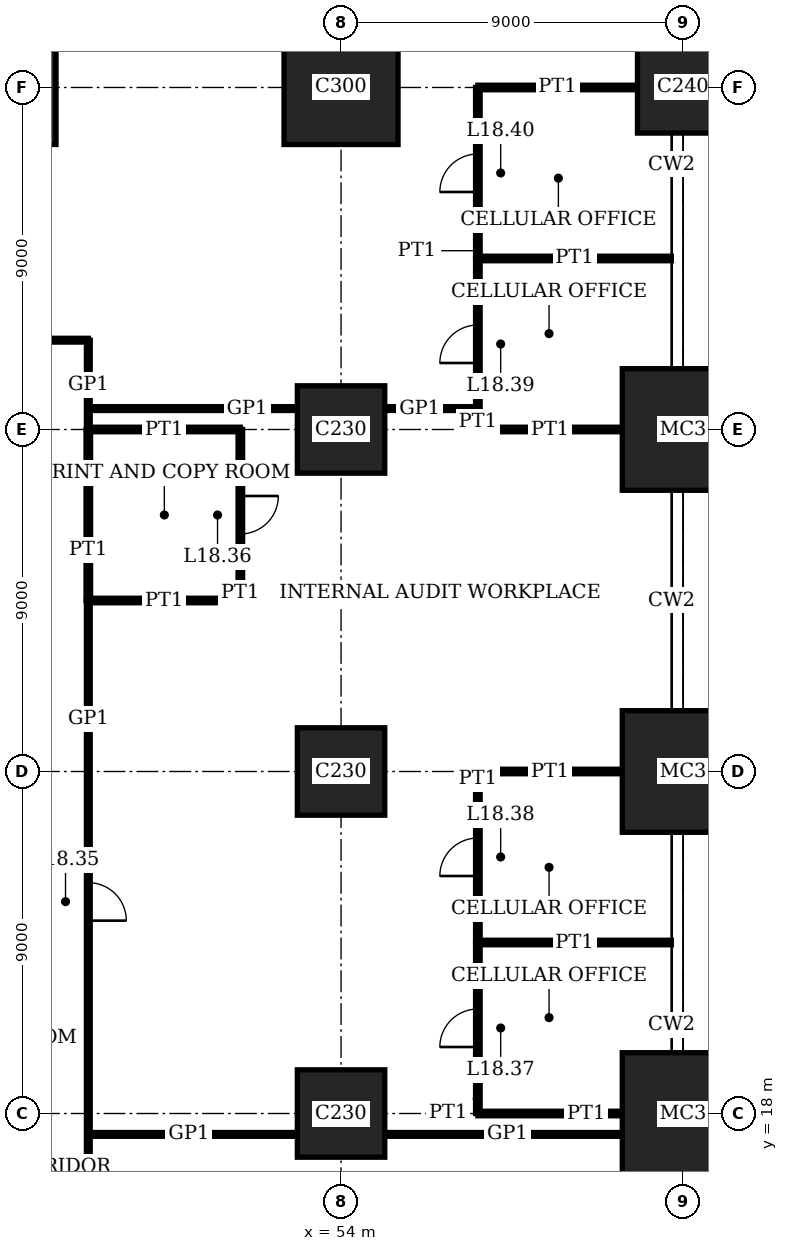
"""IFC4 building model, lengths in metres.
Left out: names, types, materials, properties, quantities, classifications, styles, units other than length and angle.
Written with IfcOpenShell. Run it as: python <this file> out.ifc"""

import sys

from ifc_helpers import new_model, si_unit, direction, frame, frame_2d, origin, origin_2d, place, context, subcontext, project, spatial, rectangle, extrude, element, fill, save


model = new_model("IFC4")
c1 = context("Model", 3, precision=1e-05, world=origin(), true_north=direction((0.0, 1.0)))
c2 = subcontext(c1, "Body", "Model", "MODEL_VIEW")
j1 = project(units=[si_unit("LENGTHUNIT", "METRE"), si_unit("PLANEANGLEUNIT", "RADIAN")], contexts=[c1])
p1 = place(None, origin())
s1 = spatial("IfcSite", under=j1, at=p1, CompositionType="ELEMENT")
p2 = place(p1, origin())
s2 = spatial("IfcBuilding", under=s1, at=p2, CompositionType="ELEMENT")
p3 = place(p2, frame((0.0, 0.0, 75.8)))
s3 = spatial("IfcBuildingStorey", under=s2, at=p3, CompositionType="ELEMENT", Elevation=75.8)
p4 = place(p3, frame((45.0, 45.0, 0.0), z_axis=(0.0, 0.0, 1.0), x_axis=(1.0, 0.0, 0.0)))
e1 = element("IfcColumn", 1, at=p4, inside=s3, PredefinedType="COLUMN", context=c2, shape_type="SweptSolid", body=[
    extrude(rectangle(XDim=3.0, YDim=3.0, at=origin_2d()), origin(), (0.0, 0.0, 1.0), 4.2),
])
for number, where, z_axis, x_axis in (
    (2, (54.0, 18.0, 0.0), (0.0, 0.0, 1.0), (1.0, 0.0, 0.0)),
    (3, (54.0, 27.0, 0.0), (0.0, 0.0, 1.0), (1.0, 0.0, 0.0)),
    (4, (54.0, 36.0, 0.0), (0.0, 0.0, 1.0), (1.0, 0.0, 0.0)),
):
    element("IfcColumn", number, at=place(p3, frame(where, z_axis=z_axis, x_axis=x_axis)), inside=s3, PredefinedType="COLUMN", context=c2, shape_type="SweptSolid", body=[
        extrude(rectangle(XDim=2.3, YDim=2.3, at=origin_2d()), origin(), (0.0, 0.0, 1.0), 4.2),
    ])
p5 = place(p3, frame((54.0, 45.0, 0.0), z_axis=(0.0, 0.0, 1.0), x_axis=(1.0, 0.0, 0.0)))
e5 = element("IfcColumn", 5, at=p5, inside=s3, PredefinedType="COLUMN", context=c2, shape_type="SweptSolid", body=[
    extrude(rectangle(XDim=3.0, YDim=3.0, at=origin_2d()), origin(), (0.0, 0.0, 1.0), 4.2),
])
for number, where, z_axis, x_axis in (
    (6, (63.0, 18.0, 0.0), (0.0, 0.0, 1.0), (1.0, 0.0, 0.0)),
    (7, (63.0, 27.0, 0.0), (0.0, 0.0, 1.0), (1.0, 0.0, 0.0)),
    (8, (63.0, 36.0, 0.0), (0.0, 0.0, 1.0), (1.0, 0.0, 0.0)),
):
    element("IfcColumn", number, at=place(p3, frame(where, z_axis=z_axis, x_axis=x_axis)), inside=s3, PredefinedType="COLUMN", context=c2, shape_type="SweptSolid", body=[
        extrude(rectangle(XDim=3.2, YDim=3.2, at=origin_2d()), origin(), (0.0, 0.0, 1.0), 4.2),
    ])
p6 = place(p3, frame((63.0, 45.0, 0.0), z_axis=(0.0, 0.0, 1.0), x_axis=(1.0, 0.0, 0.0)))
e9 = element("IfcColumn", 9, at=p6, inside=s3, PredefinedType="COLUMN", context=c2, shape_type="SweptSolid", body=[
    extrude(rectangle(XDim=2.4, YDim=2.4, at=origin_2d()), origin(), (0.0, 0.0, 1.0), 4.2),
])
p7 = place(p3, frame((47.35, 17.45, 0.0), z_axis=(0.0, 0.0, 1.0), x_axis=(1.0, 0.0, 0.0)))
e10 = element("IfcWall", 10, at=p7, inside=s3, PredefinedType="PARTITIONING", context=c2, shape_type="SweptSolid", body=[
    extrude(rectangle(XDim=5.5, YDim=0.1, at=frame_2d((2.75, 0.0))), origin(), (0.0, 0.0, 1.0), 3.85),
])
p8 = place(p3, frame((55.15, 17.45, 0.0), z_axis=(0.0, 0.0, 1.0), x_axis=(1.0, 0.0, 0.0)))
e11 = element("IfcWall", 11, at=p8, inside=s3, PredefinedType="PARTITIONING", context=c2, shape_type="SweptSolid", body=[
    extrude(rectangle(XDim=6.25, YDim=0.1, at=frame_2d((3.125, 0.0))), origin(), (0.0, 0.0, 1.0), 3.85),
])
p9 = place(p3, frame((57.6, 18.0, 0.0), z_axis=(0.0, 0.0, 1.0), x_axis=(1.0, 0.0, 0.0)))
e12 = element("IfcWall", 12, at=p9, inside=s3, PredefinedType="PARTITIONING", context=c2, shape_type="SweptSolid", body=[
    extrude(rectangle(XDim=3.8, YDim=0.12, at=frame_2d((1.9, 0.0))), origin(), (0.0, 0.0, 1.0), 3.25),
])
p10 = place(p3, frame((57.6, 22.5, 0.0), z_axis=(0.0, 0.0, 1.0), x_axis=(1.0, 0.0, 0.0)))
e13 = element("IfcWall", 13, at=p10, inside=s3, PredefinedType="PARTITIONING", context=c2, shape_type="SweptSolid", body=[
    extrude(rectangle(XDim=5.09, YDim=0.12, at=frame_2d((2.545, 0.0))), origin(), (0.0, 0.0, 1.0), 3.15),
])
p11 = place(p3, frame((57.6, 27.0, 0.0), z_axis=(0.0, 0.0, 1.0), x_axis=(1.0, 0.0, 0.0)))
e14 = element("IfcWall", 14, at=p11, inside=s3, PredefinedType="PARTITIONING", context=c2, shape_type="SweptSolid", body=[
    extrude(rectangle(XDim=3.8, YDim=0.12, at=frame_2d((1.9, 0.0))), origin(), (0.0, 0.0, 1.0), 3.25),
])
p12 = place(p3, frame((47.35, 31.5, 0.0), z_axis=(0.0, 0.0, 1.0), x_axis=(1.0, 0.0, 0.0)))
e15 = element("IfcWall", 15, at=p12, inside=s3, PredefinedType="PARTITIONING", context=c2, shape_type="SweptSolid", body=[
    extrude(rectangle(XDim=4.0, YDim=0.12, at=frame_2d((2.0, 0.0))), origin(), (0.0, 0.0, 1.0), 3.15),
])
p13 = place(p3, frame((47.35, 36.0, 0.0), z_axis=(0.0, 0.0, 1.0), x_axis=(1.0, 0.0, 0.0)))
e16 = element("IfcWall", 16, at=p13, inside=s3, PredefinedType="PARTITIONING", context=c2, shape_type="SweptSolid", body=[
    extrude(rectangle(XDim=4.0, YDim=0.12, at=frame_2d((2.0, 0.0))), origin(), (0.0, 0.0, 1.0), 3.25),
])
p14 = place(p3, frame((57.6, 36.0, 0.0), z_axis=(0.0, 0.0, 1.0), x_axis=(1.0, 0.0, 0.0)))
e17 = element("IfcWall", 17, at=p14, inside=s3, PredefinedType="PARTITIONING", context=c2, shape_type="SweptSolid", body=[
    extrude(rectangle(XDim=3.8, YDim=0.12, at=frame_2d((1.9, 0.0))), origin(), (0.0, 0.0, 1.0), 3.25),
])
p15 = place(p3, frame((47.35, 36.55, 0.0), z_axis=(0.0, 0.0, 1.0), x_axis=(1.0, 0.0, 0.0)))
e18 = element("IfcWall", 18, at=p15, inside=s3, PredefinedType="PARTITIONING", context=c2, shape_type="SweptSolid", body=[
    extrude(rectangle(XDim=5.5, YDim=0.1, at=frame_2d((2.75, 0.0))), origin(), (0.0, 0.0, 1.0), 3.85),
])
p16 = place(p3, frame((55.15, 36.55, 0.0), z_axis=(0.0, 0.0, 1.0), x_axis=(1.0, 0.0, 0.0)))
e19 = element("IfcWall", 19, at=p16, inside=s3, PredefinedType="PARTITIONING", context=c2, shape_type="SweptSolid", body=[
    extrude(rectangle(XDim=2.46, YDim=0.1, at=frame_2d((1.23, 0.0))), origin(), (0.0, 0.0, 1.0), 3.85),
])
p17 = place(p3, frame((15.65, 38.35, 0.0), z_axis=(0.0, 0.0, 1.0), x_axis=(1.0, 0.0, 0.0)))
e20 = element("IfcWall", 20, at=p17, inside=s3, PredefinedType="PARTITIONING", context=c2, shape_type="SweptSolid", body=[
    extrude(rectangle(XDim=31.7, YDim=0.1, at=frame_2d((15.85, 0.0))), origin(), (0.0, 0.0, 1.0), 3.85),
])
p18 = place(p17, frame((15.35, 0.0, 0.0)))
e21 = element("IfcOpeningElement", 21, at=p18, cuts=e20, PredefinedType="OPENING", context=c2, shape_type="SweptSolid", body=[
    extrude(rectangle(XDim=1.0, YDim=2.4, at=frame_2d((0.5, 1.2))), frame((0.0, 0.06, 0.0), z_axis=(0.0, -1.0, 0.0), x_axis=(1.0, 0.0, 0.0)), (0.0, 0.0, 1.0), 0.12),
])
p19 = place(p3, frame((57.6, 40.5, 0.0), z_axis=(0.0, 0.0, 1.0), x_axis=(1.0, 0.0, 0.0)))
e22 = element("IfcWall", 22, at=p19, inside=s3, PredefinedType="PARTITIONING", context=c2, shape_type="SweptSolid", body=[
    extrude(rectangle(XDim=5.09, YDim=0.12, at=frame_2d((2.545, 0.0))), origin(), (0.0, 0.0, 1.0), 3.15),
])
p20 = place(p3, frame((57.6, 45.0, 0.0), z_axis=(0.0, 0.0, 1.0), x_axis=(1.0, 0.0, 0.0)))
e23 = element("IfcWall", 23, at=p20, inside=s3, PredefinedType="PARTITIONING", context=c2, shape_type="SweptSolid", body=[
    extrude(rectangle(XDim=4.2, YDim=0.12, at=frame_2d((2.1, 0.0))), origin(), (0.0, 0.0, 1.0), 3.05),
])
p21 = place(p3, frame((47.35, 31.5, 0.0), z_axis=(0.0, 0.0, 1.0), x_axis=(0.0, 1.0, 0.0)))
e24 = element("IfcWall", 24, at=p21, inside=s3, PredefinedType="PARTITIONING", context=c2, shape_type="SweptSolid", body=[
    extrude(rectangle(XDim=4.5, YDim=0.12, at=frame_2d((2.25, 0.0))), origin(), (0.0, 0.0, 1.0), 3.85),
])
p22 = place(p3, frame((47.35, 15.65, 0.0), z_axis=(0.0, 0.0, 1.0), x_axis=(0.0, 1.0, 0.0)))
e25 = element("IfcWall", 25, at=p22, inside=s3, PredefinedType="PARTITIONING", context=c2, shape_type="SweptSolid", body=[
    extrude(rectangle(XDim=15.85, YDim=0.1, at=frame_2d((7.925, 0.0))), origin(), (0.0, 0.0, 1.0), 3.85),
])
p23 = place(p22, frame((7.425, 0.0, 0.0)))
e26 = element("IfcOpeningElement", 26, at=p23, cuts=e25, PredefinedType="OPENING", context=c2, shape_type="SweptSolid", body=[
    extrude(rectangle(XDim=1.0, YDim=2.4, at=frame_2d((0.5, 1.2))), frame((0.0, 0.06, 0.0), z_axis=(0.0, -1.0, 0.0), x_axis=(1.0, 0.0, 0.0)), (0.0, 0.0, 1.0), 0.12),
])
p24 = place(p3, frame((47.35, 36.0, 0.0), z_axis=(0.0, 0.0, 1.0), x_axis=(0.0, 1.0, 0.0)))
e27 = element("IfcWall", 27, at=p24, inside=s3, PredefinedType="PARTITIONING", context=c2, shape_type="SweptSolid", body=[
    extrude(rectangle(XDim=2.35, YDim=0.1, at=frame_2d((1.175, 0.0))), origin(), (0.0, 0.0, 1.0), 3.85),
])
p25 = place(p3, frame((51.35, 31.5, 0.0), z_axis=(0.0, 0.0, 1.0), x_axis=(0.0, 1.0, 0.0)))
e28 = element("IfcWall", 28, at=p25, inside=s3, PredefinedType="PARTITIONING", context=c2, shape_type="SweptSolid", body=[
    extrude(rectangle(XDim=4.5, YDim=0.12, at=frame_2d((2.25, 0.0))), origin(), (0.0, 0.0, 1.0), 3.85),
])
p26 = place(p25, frame((1.75, 0.0, 0.0)))
e29 = element("IfcOpeningElement", 29, at=p26, cuts=e28, PredefinedType="OPENING", context=c2, shape_type="SweptSolid", body=[
    extrude(rectangle(XDim=1.0, YDim=2.4, at=frame_2d((0.5, 1.2))), frame((0.0, 0.07, 0.0), z_axis=(0.0, -1.0, 0.0), x_axis=(1.0, 0.0, 0.0)), (0.0, 0.0, 1.0), 0.14),
])
p27 = place(p3, frame((57.6, 18.0, 0.0), z_axis=(0.0, 0.0, 1.0), x_axis=(0.0, 1.0, 0.0)))
e30 = element("IfcWall", 30, at=p27, inside=s3, PredefinedType="PARTITIONING", context=c2, shape_type="SweptSolid", body=[
    extrude(rectangle(XDim=4.5, YDim=0.12, at=frame_2d((2.25, 0.0))), origin(), (0.0, 0.0, 1.0), 3.85),
])
p28 = place(p27, frame((1.75, 0.0, 0.0)))
e31 = element("IfcOpeningElement", 31, at=p28, cuts=e30, PredefinedType="OPENING", context=c2, shape_type="SweptSolid", body=[
    extrude(rectangle(XDim=1.0, YDim=2.4, at=frame_2d((0.5, 1.2))), frame((0.0, 0.07, 0.0), z_axis=(0.0, -1.0, 0.0), x_axis=(1.0, 0.0, 0.0)), (0.0, 0.0, 1.0), 0.14),
])
p29 = place(p3, frame((57.6, 22.5, 0.0), z_axis=(0.0, 0.0, 1.0), x_axis=(0.0, 1.0, 0.0)))
e32 = element("IfcWall", 32, at=p29, inside=s3, PredefinedType="PARTITIONING", context=c2, shape_type="SweptSolid", body=[
    extrude(rectangle(XDim=4.5, YDim=0.12, at=frame_2d((2.25, 0.0))), origin(), (0.0, 0.0, 1.0), 3.85),
])
p30 = place(p29, frame((1.75, 0.0, 0.0)))
e33 = element("IfcOpeningElement", 33, at=p30, cuts=e32, PredefinedType="OPENING", context=c2, shape_type="SweptSolid", body=[
    extrude(rectangle(XDim=1.0, YDim=2.4, at=frame_2d((0.5, 1.2))), frame((0.0, 0.07, 0.0), z_axis=(0.0, -1.0, 0.0), x_axis=(1.0, 0.0, 0.0)), (0.0, 0.0, 1.0), 0.14),
])
p31 = place(p3, frame((57.6, 36.0, 0.0), z_axis=(0.0, 0.0, 1.0), x_axis=(0.0, 1.0, 0.0)))
e34 = element("IfcWall", 34, at=p31, inside=s3, PredefinedType="PARTITIONING", context=c2, shape_type="SweptSolid", body=[
    extrude(rectangle(XDim=4.5, YDim=0.12, at=frame_2d((2.25, 0.0))), origin(), (0.0, 0.0, 1.0), 3.85),
])
p32 = place(p31, frame((1.75, 0.0, 0.0)))
e35 = element("IfcOpeningElement", 35, at=p32, cuts=e34, PredefinedType="OPENING", context=c2, shape_type="SweptSolid", body=[
    extrude(rectangle(XDim=1.0, YDim=2.4, at=frame_2d((0.5, 1.2))), frame((0.0, 0.07, 0.0), z_axis=(0.0, -1.0, 0.0), x_axis=(1.0, 0.0, 0.0)), (0.0, 0.0, 1.0), 0.14),
])
p33 = place(p3, frame((57.6, 40.5, 0.0), z_axis=(0.0, 0.0, 1.0), x_axis=(0.0, 1.0, 0.0)))
e36 = element("IfcWall", 36, at=p33, inside=s3, PredefinedType="PARTITIONING", context=c2, shape_type="SweptSolid", body=[
    extrude(rectangle(XDim=4.5, YDim=0.12, at=frame_2d((2.25, 0.0))), origin(), (0.0, 0.0, 1.0), 3.85),
])
p34 = place(p33, frame((1.75, 0.0, 0.0)))
e37 = element("IfcOpeningElement", 37, at=p34, cuts=e36, PredefinedType="OPENING", context=c2, shape_type="SweptSolid", body=[
    extrude(rectangle(XDim=1.0, YDim=2.4, at=frame_2d((0.5, 1.2))), frame((0.0, 0.07, 0.0), z_axis=(0.0, -1.0, 0.0), x_axis=(1.0, 0.0, 0.0)), (0.0, 0.0, 1.0), 0.14),
])
p35 = place(p23, origin())
e38 = element("IfcDoor", 38, at=p35, inside=s3, OperationType="SINGLE_SWING_LEFT", PredefinedType="DOOR", context=c2, shape_type="SweptSolid", body=[
    extrude(rectangle(XDim=1.0, YDim=2.4, at=frame_2d((0.5, 1.2))), frame((0.0, 0.02, 0.0), z_axis=(0.0, -1.0, 0.0), x_axis=(1.0, 0.0, 0.0)), (0.0, 0.0, 1.0), 0.04),
])
fill(e26, e38)
p36 = place(p26, origin())
e39 = element("IfcDoor", 39, at=p36, inside=s3, OperationType="SINGLE_SWING_RIGHT", PredefinedType="DOOR", context=c2, shape_type="SweptSolid", body=[
    extrude(rectangle(XDim=1.0, YDim=2.4, at=frame_2d((0.5, 1.2))), frame((0.0, 0.025, 0.0), z_axis=(0.0, -1.0, 0.0), x_axis=(1.0, 0.0, 0.0)), (0.0, 0.0, 1.0), 0.05),
])
fill(e29, e39)
p37 = place(p28, origin())
e40 = element("IfcDoor", 40, at=p37, inside=s3, OperationType="SINGLE_SWING_RIGHT", PredefinedType="DOOR", context=c2, shape_type="SweptSolid", body=[
    extrude(rectangle(XDim=1.0, YDim=2.4, at=frame_2d((0.5, 1.2))), frame((0.0, 0.025, 0.0), z_axis=(0.0, -1.0, 0.0), x_axis=(1.0, 0.0, 0.0)), (0.0, 0.0, 1.0), 0.05),
])
fill(e31, e40)
p38 = place(p30, origin())
e41 = element("IfcDoor", 41, at=p38, inside=s3, OperationType="SINGLE_SWING_RIGHT", PredefinedType="DOOR", context=c2, shape_type="SweptSolid", body=[
    extrude(rectangle(XDim=1.0, YDim=2.4, at=frame_2d((0.5, 1.2))), frame((0.0, 0.025, 0.0), z_axis=(0.0, -1.0, 0.0), x_axis=(1.0, 0.0, 0.0)), (0.0, 0.0, 1.0), 0.05),
])
fill(e33, e41)
p39 = place(p32, origin())
e42 = element("IfcDoor", 42, at=p39, inside=s3, OperationType="SINGLE_SWING_RIGHT", PredefinedType="DOOR", context=c2, shape_type="SweptSolid", body=[
    extrude(rectangle(XDim=1.0, YDim=2.4, at=frame_2d((0.5, 1.2))), frame((0.0, 0.025, 0.0), z_axis=(0.0, -1.0, 0.0), x_axis=(1.0, 0.0, 0.0)), (0.0, 0.0, 1.0), 0.05),
])
fill(e35, e42)
p40 = place(p34, origin())
e43 = element("IfcDoor", 43, at=p40, inside=s3, OperationType="SINGLE_SWING_RIGHT", PredefinedType="DOOR", context=c2, shape_type="SweptSolid", body=[
    extrude(rectangle(XDim=1.0, YDim=2.4, at=frame_2d((0.5, 1.2))), frame((0.0, 0.025, 0.0), z_axis=(0.0, -1.0, 0.0), x_axis=(1.0, 0.0, 0.0)), (0.0, 0.0, 1.0), 0.05),
])
fill(e37, e43)
save(model, sys.argv[1])
